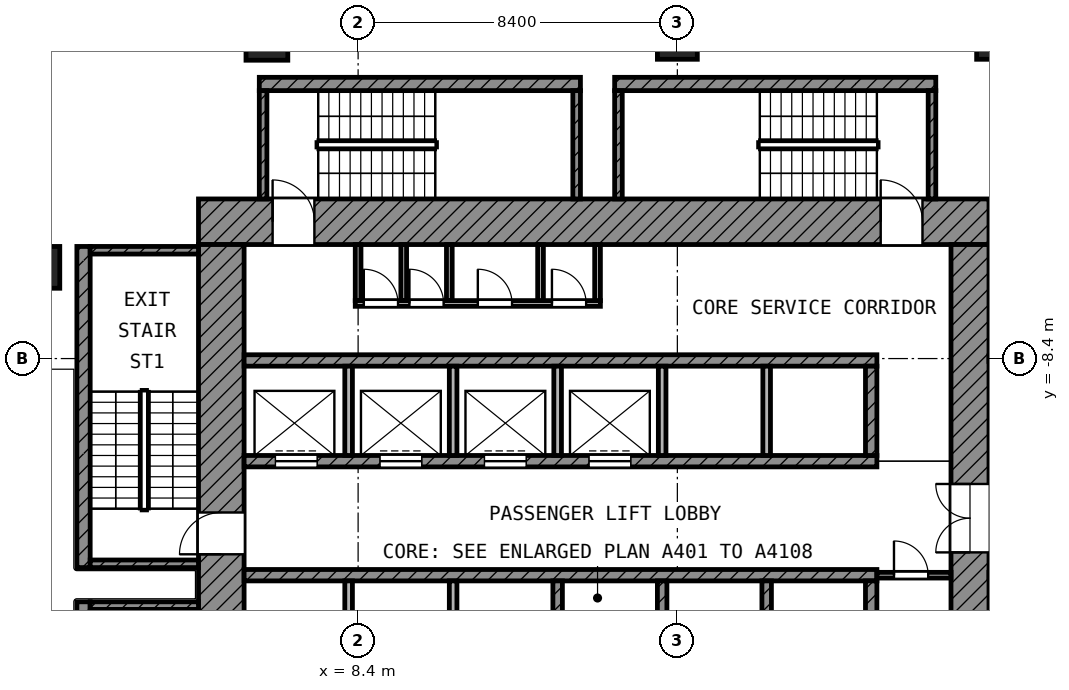
"""IFC4 building model, lengths in metres.
Left out: names, types, materials, properties, quantities, classifications, styles, units other than length and angle.
Written with IfcOpenShell. Run it as: python <this file> out.ifc"""

import sys

from ifc_helpers import new_model, si_unit, direction, frame, frame_2d, origin, origin_2d, place, context, subcontext, project, spatial, rectangle, extrude, element, fill, save


model = new_model("IFC4")
c1 = context("Model", 3, precision=1e-05, world=origin(), true_north=direction((0.0, 1.0)))
c2 = subcontext(c1, "Body", "Model", "MODEL_VIEW")
j1 = project(units=[si_unit("LENGTHUNIT", "METRE"), si_unit("PLANEANGLEUNIT", "RADIAN")], contexts=[c1])
p1 = place(None, origin())
s1 = spatial("IfcSite", under=j1, at=p1, CompositionType="ELEMENT")
p2 = place(p1, origin())
s2 = spatial("IfcBuilding", under=s1, at=p2, CompositionType="ELEMENT")
p3 = place(p2, frame((0.0, 0.0, 98.8)))
s3 = spatial("IfcBuildingStorey", under=s2, at=p3, CompositionType="ELEMENT", Elevation=98.8)
p4 = place(p3, frame((6.0, 0.0, 0.0), z_axis=(0.0, 0.0, 1.0), x_axis=(1.0, 0.0, 0.0)))
e1 = element("IfcColumn", 1, at=p4, inside=s3, PredefinedType="COLUMN", context=c2, shape_type="SweptSolid", body=[
    extrude(rectangle(XDim=1.1, YDim=1.1, at=origin_2d()), origin(), (0.0, 0.0, 1.0), 4.2),
])
for number, where, z_axis, x_axis in (
    (2, (16.8, 0.0, 0.0), (0.0, 0.0, 1.0), (1.0, 0.0, 0.0)),
    (3, (25.2, 0.0, 0.0), (0.0, 0.0, 1.0), (1.0, 0.0, 0.0)),
):
    element("IfcColumn", number, at=place(p3, frame(where, z_axis=z_axis, x_axis=x_axis)), inside=s3, PredefinedType="COLUMN", context=c2, shape_type="SweptSolid", body=[
        extrude(rectangle(XDim=1.05, YDim=1.05, at=origin_2d()), origin(), (0.0, 0.0, 1.0), 4.2),
    ])
p5 = place(p3, frame((0.0, -6.0, 0.0), z_axis=(0.0, 0.0, 1.0), x_axis=(1.0, 0.0, 0.0)))
e4 = element("IfcColumn", 4, at=p5, inside=s3, PredefinedType="COLUMN", context=c2, shape_type="SweptSolid", body=[
    extrude(rectangle(XDim=1.1, YDim=1.1, at=origin_2d()), origin(), (0.0, 0.0, 1.0), 4.2),
])
p6 = place(p3, frame((4.2, -4.8, 0.0), z_axis=(0.0, 0.0, 1.0), x_axis=(1.0, 0.0, 0.0)))
e5 = element("IfcWall", 5, at=p6, inside=s3, PredefinedType="SHEAR", context=c2, shape_type="SweptSolid", body=[
    extrude(rectangle(XDim=20.8, YDim=1.2, at=frame_2d((10.4, 0.0))), origin(), (0.0, 0.0, 1.0), 3.6),
])
p7 = place(p6, frame((1.95, 0.0, 0.0)))
e6 = element("IfcOpeningElement", 6, at=p7, cuts=e5, PredefinedType="OPENING", context=c2, shape_type="SweptSolid", body=[
    extrude(rectangle(XDim=1.1, YDim=2.1, at=frame_2d((0.55, 1.05))), frame((0.0, 0.61, 0.0), z_axis=(0.0, -1.0, 0.0), x_axis=(1.0, 0.0, 0.0)), (0.0, 0.0, 1.0), 1.22),
])
p8 = place(p6, frame((17.95, 0.0, 0.0)))
e7 = element("IfcOpeningElement", 7, at=p8, cuts=e5, PredefinedType="OPENING", context=c2, shape_type="SweptSolid", body=[
    extrude(rectangle(XDim=1.1, YDim=2.1, at=frame_2d((0.55, 1.05))), frame((0.0, 0.61, 0.0), z_axis=(0.0, -1.0, 0.0), x_axis=(1.0, 0.0, 0.0)), (0.0, 0.0, 1.0), 1.22),
])
p9 = place(p3, frame((4.8, -25.0, 0.0), z_axis=(0.0, 0.0, 1.0), x_axis=(0.0, 1.0, 0.0)))
e8 = element("IfcWall", 8, at=p9, inside=s3, PredefinedType="SHEAR", context=c2, shape_type="SweptSolid", body=[
    extrude(rectangle(XDim=19.6, YDim=1.2, at=frame_2d((9.8, 0.0))), origin(), (0.0, 0.0, 1.0), 3.6),
])
p10 = place(p9, frame((11.45, 0.0, 0.0)))
e9 = element("IfcOpeningElement", 9, at=p10, cuts=e8, PredefinedType="OPENING", context=c2, shape_type="SweptSolid", body=[
    extrude(rectangle(XDim=1.1, YDim=2.1, at=frame_2d((0.55, 1.05))), frame((0.0, 0.61, 0.0), z_axis=(0.0, -1.0, 0.0), x_axis=(1.0, 0.0, 0.0)), (0.0, 0.0, 1.0), 1.22),
])
p11 = place(p9, frame((2.15, 0.0, 0.0)))
e10 = element("IfcOpeningElement", 10, at=p11, cuts=e8, PredefinedType="OPENING", context=c2, shape_type="SweptSolid", body=[
    extrude(rectangle(XDim=1.1, YDim=2.1, at=frame_2d((0.55, 1.05))), frame((0.0, 0.61, 0.0), z_axis=(0.0, -1.0, 0.0), x_axis=(1.0, 0.0, 0.0)), (0.0, 0.0, 1.0), 1.22),
])
p12 = place(p3, frame((24.5, -24.0, 0.0), z_axis=(0.0, 0.0, 1.0), x_axis=(0.0, 1.0, 0.0)))
e11 = element("IfcWall", 11, at=p12, inside=s3, PredefinedType="SHEAR", context=c2, shape_type="SweptSolid", body=[
    extrude(rectangle(XDim=18.6, YDim=1.0, at=frame_2d((9.3, 0.0))), origin(), (0.0, 0.0, 1.0), 3.6),
])
p13 = place(p12, frame((10.5, 0.0, 0.0)))
e12 = element("IfcOpeningElement", 12, at=p13, cuts=e11, PredefinedType="OPENING", context=c2, shape_type="SweptSolid", body=[
    extrude(rectangle(XDim=1.8, YDim=2.1, at=frame_2d((0.9, 1.05))), frame((0.0, 0.51, 0.0), z_axis=(0.0, -1.0, 0.0), x_axis=(1.0, 0.0, 0.0)), (0.0, 0.0, 1.0), 1.02),
])
p14 = place(p3, frame((5.4, -8.45, 0.0), z_axis=(0.0, 0.0, 1.0), x_axis=(1.0, 0.0, 0.0)))
e13 = element("IfcWall", 13, at=p14, inside=s3, PredefinedType="SHEAR", context=c2, shape_type="SweptSolid", body=[
    extrude(rectangle(XDim=16.65, YDim=0.3, at=frame_2d((8.325, 0.0))), origin(), (0.0, 0.0, 1.0), 3.6),
])
p15 = place(p3, frame((5.4, -11.1, 0.0), z_axis=(0.0, 0.0, 1.0), x_axis=(1.0, 0.0, 0.0)))
e14 = element("IfcWall", 14, at=p15, inside=s3, PredefinedType="SHEAR", context=c2, shape_type="SweptSolid", body=[
    extrude(rectangle(XDim=16.65, YDim=0.3, at=frame_2d((8.325, 0.0))), origin(), (0.0, 0.0, 1.0), 3.6),
])
p16 = place(p15, frame((0.825, 0.0, 0.0)))
e15 = element("IfcOpeningElement", 15, at=p16, cuts=e14, PredefinedType="OPENING", context=c2, shape_type="SweptSolid", body=[
    extrude(rectangle(XDim=1.1, YDim=2.1, at=frame_2d((0.55, 1.05))), frame((0.0, 0.16, 0.0), z_axis=(0.0, -1.0, 0.0), x_axis=(1.0, 0.0, 0.0)), (0.0, 0.0, 1.0), 0.32),
])
p17 = place(p15, frame((3.575, 0.0, 0.0)))
e16 = element("IfcOpeningElement", 16, at=p17, cuts=e14, PredefinedType="OPENING", context=c2, shape_type="SweptSolid", body=[
    extrude(rectangle(XDim=1.1, YDim=2.1, at=frame_2d((0.55, 1.05))), frame((0.0, 0.16, 0.0), z_axis=(0.0, -1.0, 0.0), x_axis=(1.0, 0.0, 0.0)), (0.0, 0.0, 1.0), 0.32),
])
p18 = place(p15, frame((6.325, 0.0, 0.0)))
e17 = element("IfcOpeningElement", 17, at=p18, cuts=e14, PredefinedType="OPENING", context=c2, shape_type="SweptSolid", body=[
    extrude(rectangle(XDim=1.1, YDim=2.1, at=frame_2d((0.55, 1.05))), frame((0.0, 0.16, 0.0), z_axis=(0.0, -1.0, 0.0), x_axis=(1.0, 0.0, 0.0)), (0.0, 0.0, 1.0), 0.32),
])
p19 = place(p15, frame((9.075, 0.0, 0.0)))
e18 = element("IfcOpeningElement", 18, at=p19, cuts=e14, PredefinedType="OPENING", context=c2, shape_type="SweptSolid", body=[
    extrude(rectangle(XDim=1.1, YDim=2.1, at=frame_2d((0.55, 1.05))), frame((0.0, 0.16, 0.0), z_axis=(0.0, -1.0, 0.0), x_axis=(1.0, 0.0, 0.0)), (0.0, 0.0, 1.0), 0.32),
])
p20 = place(p3, frame((5.4, -14.1, 0.0), z_axis=(0.0, 0.0, 1.0), x_axis=(1.0, 0.0, 0.0)))
e19 = element("IfcWall", 19, at=p20, inside=s3, PredefinedType="SHEAR", context=c2, shape_type="SweptSolid", body=[
    extrude(rectangle(XDim=16.65, YDim=0.3, at=frame_2d((8.325, 0.0))), origin(), (0.0, 0.0, 1.0), 3.6),
])
p21 = place(p3, frame((21.9, -10.95, 0.0), z_axis=(0.0, 0.0, 1.0), x_axis=(0.0, 1.0, 0.0)))
e20 = element("IfcWall", 20, at=p21, inside=s3, PredefinedType="SHEAR", context=c2, shape_type="SweptSolid", body=[
    extrude(rectangle(XDim=2.35, YDim=0.3, at=frame_2d((1.175, 0.0))), origin(), (0.0, 0.0, 1.0), 3.6),
])
p22 = place(p3, frame((21.9, -16.6, 0.0), z_axis=(0.0, 0.0, 1.0), x_axis=(0.0, 1.0, 0.0)))
e21 = element("IfcWall", 21, at=p22, inside=s3, PredefinedType="SHEAR", context=c2, shape_type="SweptSolid", body=[
    extrude(rectangle(XDim=2.35, YDim=0.3, at=frame_2d((1.175, 0.0))), origin(), (0.0, 0.0, 1.0), 3.6),
])
for number, where, z_axis, x_axis in (
    (22, (8.15, -10.95, 0.0), (0.0, 0.0, 1.0), (0.0, 1.0, 0.0)),
    (23, (10.9, -10.95, 0.0), (0.0, 0.0, 1.0), (0.0, 1.0, 0.0)),
    (24, (13.65, -10.95, 0.0), (0.0, 0.0, 1.0), (0.0, 1.0, 0.0)),
    (25, (16.4, -10.95, 0.0), (0.0, 0.0, 1.0), (0.0, 1.0, 0.0)),
    (26, (19.15, -10.95, 0.0), (0.0, 0.0, 1.0), (0.0, 1.0, 0.0)),
):
    element("IfcWall", number, at=place(p3, frame(where, z_axis=z_axis, x_axis=x_axis)), inside=s3, PredefinedType="PARTITIONING", context=c2, shape_type="SweptSolid", body=[
        extrude(rectangle(XDim=2.35, YDim=0.2, at=frame_2d((1.175, 0.0))), origin(), (0.0, 0.0, 1.0), 3.6),
    ])
for number, where, z_axis, x_axis in (
    (27, (8.15, -16.6, 0.0), (0.0, 0.0, 1.0), (0.0, 1.0, 0.0)),
    (28, (10.9, -16.6, 0.0), (0.0, 0.0, 1.0), (0.0, 1.0, 0.0)),
):
    element("IfcWall", number, at=place(p3, frame(where, z_axis=z_axis, x_axis=x_axis)), inside=s3, PredefinedType="PARTITIONING", context=c2, shape_type="SweptSolid", body=[
        extrude(rectangle(XDim=2.35, YDim=0.2, at=frame_2d((1.175, 0.0))), origin(), (0.0, 0.0, 1.0), 3.6),
    ])
for number, where, z_axis, x_axis in (
    (29, (13.65, -16.6, 0.0), (0.0, 0.0, 1.0), (0.0, 1.0, 0.0)),
    (30, (16.4, -16.6, 0.0), (0.0, 0.0, 1.0), (0.0, 1.0, 0.0)),
    (31, (19.15, -16.6, 0.0), (0.0, 0.0, 1.0), (0.0, 1.0, 0.0)),
):
    element("IfcWall", number, at=place(p3, frame(where, z_axis=z_axis, x_axis=x_axis)), inside=s3, PredefinedType="SHEAR", context=c2, shape_type="SweptSolid", body=[
        extrude(rectangle(XDim=2.35, YDim=0.25, at=frame_2d((1.175, 0.0))), origin(), (0.0, 0.0, 1.0), 3.6),
    ])
p23 = place(p3, frame((22.05, -14.1, 0.0), z_axis=(0.0, 0.0, 1.0), x_axis=(1.0, 0.0, 0.0)))
e32 = element("IfcWall", 32, at=p23, inside=s3, PredefinedType="PARTITIONING", context=c2, shape_type="SweptSolid", body=[
    extrude(rectangle(XDim=1.95, YDim=0.15, at=frame_2d((0.975, 0.0))), origin(), (0.0, 0.0, 1.0), 3.6),
])
p24 = place(p23, frame((0.45, 0.0, 0.0)))
e33 = element("IfcOpeningElement", 33, at=p24, cuts=e32, PredefinedType="OPENING", context=c2, shape_type="SweptSolid", body=[
    extrude(rectangle(XDim=0.9, YDim=2.1, at=frame_2d((0.45, 1.05))), frame((0.0, 0.085, 0.0), z_axis=(0.0, -1.0, 0.0), x_axis=(1.0, 0.0, 0.0)), (0.0, 0.0, 1.0), 0.17),
])
p25 = place(p3, frame((8.325, -6.95, 0.0), z_axis=(0.0, 0.0, 1.0), x_axis=(1.0, 0.0, 0.0)))
e34 = element("IfcWall", 34, at=p25, inside=s3, PredefinedType="PARTITIONING", context=c2, shape_type="SweptSolid", body=[
    extrude(rectangle(XDim=6.45, YDim=0.15, at=frame_2d((3.225, 0.0))), origin(), (0.0, 0.0, 1.0), 3.6),
])
p26 = place(p25, frame((0.225, 0.0, 0.0)))
e35 = element("IfcOpeningElement", 35, at=p26, cuts=e34, PredefinedType="OPENING", context=c2, shape_type="SweptSolid", body=[
    extrude(rectangle(XDim=0.9, YDim=2.1, at=frame_2d((0.45, 1.05))), frame((0.0, 0.085, 0.0), z_axis=(0.0, -1.0, 0.0), x_axis=(1.0, 0.0, 0.0)), (0.0, 0.0, 1.0), 0.17),
])
p27 = place(p25, frame((1.425, 0.0, 0.0)))
e36 = element("IfcOpeningElement", 36, at=p27, cuts=e34, PredefinedType="OPENING", context=c2, shape_type="SweptSolid", body=[
    extrude(rectangle(XDim=0.9, YDim=2.1, at=frame_2d((0.45, 1.05))), frame((0.0, 0.085, 0.0), z_axis=(0.0, -1.0, 0.0), x_axis=(1.0, 0.0, 0.0)), (0.0, 0.0, 1.0), 0.17),
])
p28 = place(p25, frame((3.225, 0.0, 0.0)))
e37 = element("IfcOpeningElement", 37, at=p28, cuts=e34, PredefinedType="OPENING", context=c2, shape_type="SweptSolid", body=[
    extrude(rectangle(XDim=0.9, YDim=2.1, at=frame_2d((0.45, 1.05))), frame((0.0, 0.085, 0.0), z_axis=(0.0, -1.0, 0.0), x_axis=(1.0, 0.0, 0.0)), (0.0, 0.0, 1.0), 0.17),
])
p29 = place(p25, frame((5.175, 0.0, 0.0)))
e38 = element("IfcOpeningElement", 38, at=p29, cuts=e34, PredefinedType="OPENING", context=c2, shape_type="SweptSolid", body=[
    extrude(rectangle(XDim=0.9, YDim=2.1, at=frame_2d((0.45, 1.05))), frame((0.0, 0.085, 0.0), z_axis=(0.0, -1.0, 0.0), x_axis=(1.0, 0.0, 0.0)), (0.0, 0.0, 1.0), 0.17),
])
for number, where, z_axis, x_axis in (
    (39, (8.4, -6.875, 0.0), (0.0, 0.0, 1.0), (0.0, 1.0, 0.0)),
    (40, (9.6, -6.875, 0.0), (0.0, 0.0, 1.0), (0.0, 1.0, 0.0)),
    (41, (10.8, -6.875, 0.0), (0.0, 0.0, 1.0), (0.0, 1.0, 0.0)),
    (42, (13.2, -6.875, 0.0), (0.0, 0.0, 1.0), (0.0, 1.0, 0.0)),
    (43, (14.7, -6.875, 0.0), (0.0, 0.0, 1.0), (0.0, 1.0, 0.0)),
):
    element("IfcWall", number, at=place(p3, frame(where, z_axis=z_axis, x_axis=x_axis)), inside=s3, PredefinedType="PARTITIONING", context=c2, shape_type="SweptSolid", body=[
        extrude(rectangle(XDim=1.475, YDim=0.15, at=frame_2d((0.738, 0.0))), origin(), (0.0, 0.0, 1.0), 3.6),
    ])
p30 = place(p3, frame((1.175, -13.9, 0.0), z_axis=(0.0, 0.0, 1.0), x_axis=(0.0, 1.0, 0.0)))
e44 = element("IfcWall", 44, at=p30, inside=s3, PredefinedType="SHEAR", context=c2, shape_type="SweptSolid", body=[
    extrude(rectangle(XDim=8.45, YDim=0.35, at=frame_2d((4.225, 0.0))), origin(), (0.0, 0.0, 1.0), 3.6),
])
for number, where, z_axis, x_axis in (
    (45, (1.35, -5.55, 0.0), (0.0, 0.0, 1.0), (1.0, 0.0, 0.0)),
    (46, (1.35, -13.8, 0.0), (0.0, 0.0, 1.0), (1.0, 0.0, 0.0)),
):
    element("IfcWall", number, at=place(p3, frame(where, z_axis=z_axis, x_axis=x_axis)), inside=s3, PredefinedType="SHEAR", context=c2, shape_type="SweptSolid", body=[
        extrude(rectangle(XDim=2.85, YDim=0.2, at=frame_2d((1.425, 0.0))), origin(), (0.0, 0.0, 1.0), 3.6),
    ])
p31 = place(p3, frame((1.175, -23.25, 0.0), z_axis=(0.0, 0.0, 1.0), x_axis=(0.0, 1.0, 0.0)))
e47 = element("IfcWall", 47, at=p31, inside=s3, PredefinedType="SHEAR", context=c2, shape_type="SweptSolid", body=[
    extrude(rectangle(XDim=8.45, YDim=0.35, at=frame_2d((4.225, 0.0))), origin(), (0.0, 0.0, 1.0), 3.6),
])
p32 = place(p3, frame((1.35, -14.9, 0.0), z_axis=(0.0, 0.0, 1.0), x_axis=(1.0, 0.0, 0.0)))
e48 = element("IfcWall", 48, at=p32, inside=s3, PredefinedType="SHEAR", context=c2, shape_type="SweptSolid", body=[
    extrude(rectangle(XDim=2.85, YDim=0.2, at=frame_2d((1.425, 0.0))), origin(), (0.0, 0.0, 1.0), 3.6),
])
p33 = place(p3, frame((5.8, -1.175, 0.0), z_axis=(0.0, 0.0, 1.0), x_axis=(1.0, 0.0, 0.0)))
e49 = element("IfcWall", 49, at=p33, inside=s3, PredefinedType="SHEAR", context=c2, shape_type="SweptSolid", body=[
    extrude(rectangle(XDim=8.45, YDim=0.35, at=frame_2d((4.225, 0.0))), origin(), (0.0, 0.0, 1.0), 3.6),
])
for number, where, z_axis, x_axis in (
    (50, (5.9, -4.2, 0.0), (0.0, 0.0, 1.0), (0.0, 1.0, 0.0)),
    (51, (14.15, -4.2, 0.0), (0.0, 0.0, 1.0), (0.0, 1.0, 0.0)),
):
    element("IfcWall", number, at=place(p3, frame(where, z_axis=z_axis, x_axis=x_axis)), inside=s3, PredefinedType="SHEAR", context=c2, shape_type="SweptSolid", body=[
        extrude(rectangle(XDim=2.85, YDim=0.2, at=frame_2d((1.425, 0.0))), origin(), (0.0, 0.0, 1.0), 3.6),
    ])
p34 = place(p3, frame((15.15, -1.175, 0.0), z_axis=(0.0, 0.0, 1.0), x_axis=(1.0, 0.0, 0.0)))
e52 = element("IfcWall", 52, at=p34, inside=s3, PredefinedType="SHEAR", context=c2, shape_type="SweptSolid", body=[
    extrude(rectangle(XDim=8.45, YDim=0.35, at=frame_2d((4.225, 0.0))), origin(), (0.0, 0.0, 1.0), 3.6),
])
for number, where, z_axis, x_axis in (
    (53, (15.25, -4.2, 0.0), (0.0, 0.0, 1.0), (0.0, 1.0, 0.0)),
    (54, (23.5, -4.2, 0.0), (0.0, 0.0, 1.0), (0.0, 1.0, 0.0)),
):
    element("IfcWall", number, at=place(p3, frame(where, z_axis=z_axis, x_axis=x_axis)), inside=s3, PredefinedType="SHEAR", context=c2, shape_type="SweptSolid", body=[
        extrude(rectangle(XDim=2.85, YDim=0.2, at=frame_2d((1.425, 0.0))), origin(), (0.0, 0.0, 1.0), 3.6),
    ])
p35 = place(p3, frame((25.0, -8.4, 0.0), z_axis=(0.0, 0.0, 1.0), x_axis=(1.0, 0.0, 0.0)))
e55 = element("IfcWall", 55, at=p35, inside=s3, PredefinedType="PARTITIONING", context=c2, shape_type="SweptSolid", body=[
    extrude(rectangle(XDim=15.182, YDim=0.15, at=frame_2d((7.591, 0.0))), origin(), (0.0, 0.0, 1.0), 3.6),
])
p36 = place(p35, frame((0.8, 0.0, 0.0)))
e56 = element("IfcOpeningElement", 56, at=p36, cuts=e55, PredefinedType="OPENING", context=c2, shape_type="SweptSolid", body=[
    extrude(rectangle(XDim=0.9, YDim=2.1, at=frame_2d((0.45, 1.05))), frame((0.0, 0.085, 0.0), z_axis=(0.0, -1.0, 0.0), x_axis=(1.0, 0.0, 0.0)), (0.0, 0.0, 1.0), 0.17),
])
p37 = place(p35, frame((2.85, 0.0, 0.0)))
e57 = element("IfcOpeningElement", 57, at=p37, cuts=e55, PredefinedType="OPENING", context=c2, shape_type="SweptSolid", body=[
    extrude(rectangle(XDim=1.0, YDim=2.1, at=frame_2d((0.5, 1.05))), frame((0.0, 0.085, 0.0), z_axis=(0.0, -1.0, 0.0), x_axis=(1.0, 0.0, 0.0)), (0.0, 0.0, 1.0), 0.17),
])
p38 = place(p35, frame((9.241, 0.0, 0.0)))
e58 = element("IfcOpeningElement", 58, at=p38, cuts=e55, PredefinedType="OPENING", context=c2, shape_type="SweptSolid", body=[
    extrude(rectangle(XDim=1.5, YDim=2.1, at=frame_2d((0.75, 1.05))), frame((0.0, 0.085, 0.0), z_axis=(0.0, -1.0, 0.0), x_axis=(1.0, 0.0, 0.0)), (0.0, 0.0, 1.0), 0.17),
])
p39 = place(p16, origin())
e59 = element("IfcDoor", 59, at=p39, inside=s3, OperationType="DOUBLE_DOOR_SLIDING", PredefinedType="DOOR", context=c2, shape_type="SweptSolid", body=[
    extrude(rectangle(XDim=1.1, YDim=2.1, at=frame_2d((0.55, 1.05))), frame((0.0, 0.025, 0.0), z_axis=(0.0, -1.0, 0.0), x_axis=(1.0, 0.0, 0.0)), (0.0, 0.0, 1.0), 0.05),
])
fill(e15, e59)
p40 = place(p17, origin())
e60 = element("IfcDoor", 60, at=p40, inside=s3, OperationType="DOUBLE_DOOR_SLIDING", PredefinedType="DOOR", context=c2, shape_type="SweptSolid", body=[
    extrude(rectangle(XDim=1.1, YDim=2.1, at=frame_2d((0.55, 1.05))), frame((0.0, 0.025, 0.0), z_axis=(0.0, -1.0, 0.0), x_axis=(1.0, 0.0, 0.0)), (0.0, 0.0, 1.0), 0.05),
])
fill(e16, e60)
p41 = place(p18, origin())
e61 = element("IfcDoor", 61, at=p41, inside=s3, OperationType="DOUBLE_DOOR_SLIDING", PredefinedType="DOOR", context=c2, shape_type="SweptSolid", body=[
    extrude(rectangle(XDim=1.1, YDim=2.1, at=frame_2d((0.55, 1.05))), frame((0.0, 0.025, 0.0), z_axis=(0.0, -1.0, 0.0), x_axis=(1.0, 0.0, 0.0)), (0.0, 0.0, 1.0), 0.05),
])
fill(e17, e61)
p42 = place(p19, origin())
e62 = element("IfcDoor", 62, at=p42, inside=s3, OperationType="DOUBLE_DOOR_SLIDING", PredefinedType="DOOR", context=c2, shape_type="SweptSolid", body=[
    extrude(rectangle(XDim=1.1, YDim=2.1, at=frame_2d((0.55, 1.05))), frame((0.0, 0.025, 0.0), z_axis=(0.0, -1.0, 0.0), x_axis=(1.0, 0.0, 0.0)), (0.0, 0.0, 1.0), 0.05),
])
fill(e18, e62)
p43 = place(p10, origin())
e63 = element("IfcDoor", 63, at=p43, inside=s3, OperationType="SINGLE_SWING_LEFT", PredefinedType="DOOR", context=c2, shape_type="SweptSolid", body=[
    extrude(rectangle(XDim=1.1, YDim=2.1, at=frame_2d((0.55, 1.05))), frame((0.0, 0.025, 0.0), z_axis=(0.0, -1.0, 0.0), x_axis=(1.0, 0.0, 0.0)), (0.0, 0.0, 1.0), 0.05),
])
fill(e9, e63)
p44 = place(p7, origin())
e64 = element("IfcDoor", 64, at=p44, inside=s3, OperationType="SINGLE_SWING_LEFT", PredefinedType="DOOR", context=c2, shape_type="SweptSolid", body=[
    extrude(rectangle(XDim=1.1, YDim=2.1, at=frame_2d((0.55, 1.05))), frame((0.0, 0.025, 0.0), z_axis=(0.0, -1.0, 0.0), x_axis=(1.0, 0.0, 0.0)), (0.0, 0.0, 1.0), 0.05),
])
fill(e6, e64)
p45 = place(p8, origin())
e65 = element("IfcDoor", 65, at=p45, inside=s3, OperationType="SINGLE_SWING_LEFT", PredefinedType="DOOR", context=c2, shape_type="SweptSolid", body=[
    extrude(rectangle(XDim=1.1, YDim=2.1, at=frame_2d((0.55, 1.05))), frame((0.0, 0.025, 0.0), z_axis=(0.0, -1.0, 0.0), x_axis=(1.0, 0.0, 0.0)), (0.0, 0.0, 1.0), 0.05),
])
fill(e7, e65)
p46 = place(p13, origin())
e66 = element("IfcDoor", 66, at=p46, inside=s3, OperationType="DOUBLE_DOOR_SINGLE_SWING", PredefinedType="DOOR", context=c2, shape_type="SweptSolid", body=[
    extrude(rectangle(XDim=1.8, YDim=2.1, at=frame_2d((0.9, 1.05))), frame((0.0, 0.025, 0.0), z_axis=(0.0, -1.0, 0.0), x_axis=(1.0, 0.0, 0.0)), (0.0, 0.0, 1.0), 0.05),
])
fill(e12, e66)
p47 = place(p26, origin())
e67 = element("IfcDoor", 67, at=p47, inside=s3, OperationType="SINGLE_SWING_LEFT", PredefinedType="DOOR", context=c2, shape_type="SweptSolid", body=[
    extrude(rectangle(XDim=0.9, YDim=2.1, at=frame_2d((0.45, 1.05))), frame((0.0, 0.025, 0.0), z_axis=(0.0, -1.0, 0.0), x_axis=(1.0, 0.0, 0.0)), (0.0, 0.0, 1.0), 0.05),
])
fill(e35, e67)
p48 = place(p27, origin())
e68 = element("IfcDoor", 68, at=p48, inside=s3, OperationType="SINGLE_SWING_LEFT", PredefinedType="DOOR", context=c2, shape_type="SweptSolid", body=[
    extrude(rectangle(XDim=0.9, YDim=2.1, at=frame_2d((0.45, 1.05))), frame((0.0, 0.025, 0.0), z_axis=(0.0, -1.0, 0.0), x_axis=(1.0, 0.0, 0.0)), (0.0, 0.0, 1.0), 0.05),
])
fill(e36, e68)
p49 = place(p28, origin())
e69 = element("IfcDoor", 69, at=p49, inside=s3, OperationType="SINGLE_SWING_LEFT", PredefinedType="DOOR", context=c2, shape_type="SweptSolid", body=[
    extrude(rectangle(XDim=0.9, YDim=2.1, at=frame_2d((0.45, 1.05))), frame((0.0, 0.025, 0.0), z_axis=(0.0, -1.0, 0.0), x_axis=(1.0, 0.0, 0.0)), (0.0, 0.0, 1.0), 0.05),
])
fill(e37, e69)
p50 = place(p29, origin())
e70 = element("IfcDoor", 70, at=p50, inside=s3, OperationType="SINGLE_SWING_LEFT", PredefinedType="DOOR", context=c2, shape_type="SweptSolid", body=[
    extrude(rectangle(XDim=0.9, YDim=2.1, at=frame_2d((0.45, 1.05))), frame((0.0, 0.025, 0.0), z_axis=(0.0, -1.0, 0.0), x_axis=(1.0, 0.0, 0.0)), (0.0, 0.0, 1.0), 0.05),
])
fill(e38, e70)
p51 = place(p24, origin())
e71 = element("IfcDoor", 71, at=p51, inside=s3, OperationType="SINGLE_SWING_LEFT", PredefinedType="DOOR", context=c2, shape_type="SweptSolid", body=[
    extrude(rectangle(XDim=0.9, YDim=2.1, at=frame_2d((0.45, 1.05))), frame((0.0, 0.025, 0.0), z_axis=(0.0, -1.0, 0.0), x_axis=(1.0, 0.0, 0.0)), (0.0, 0.0, 1.0), 0.05),
])
fill(e33, e71)
save(model, sys.argv[1])
